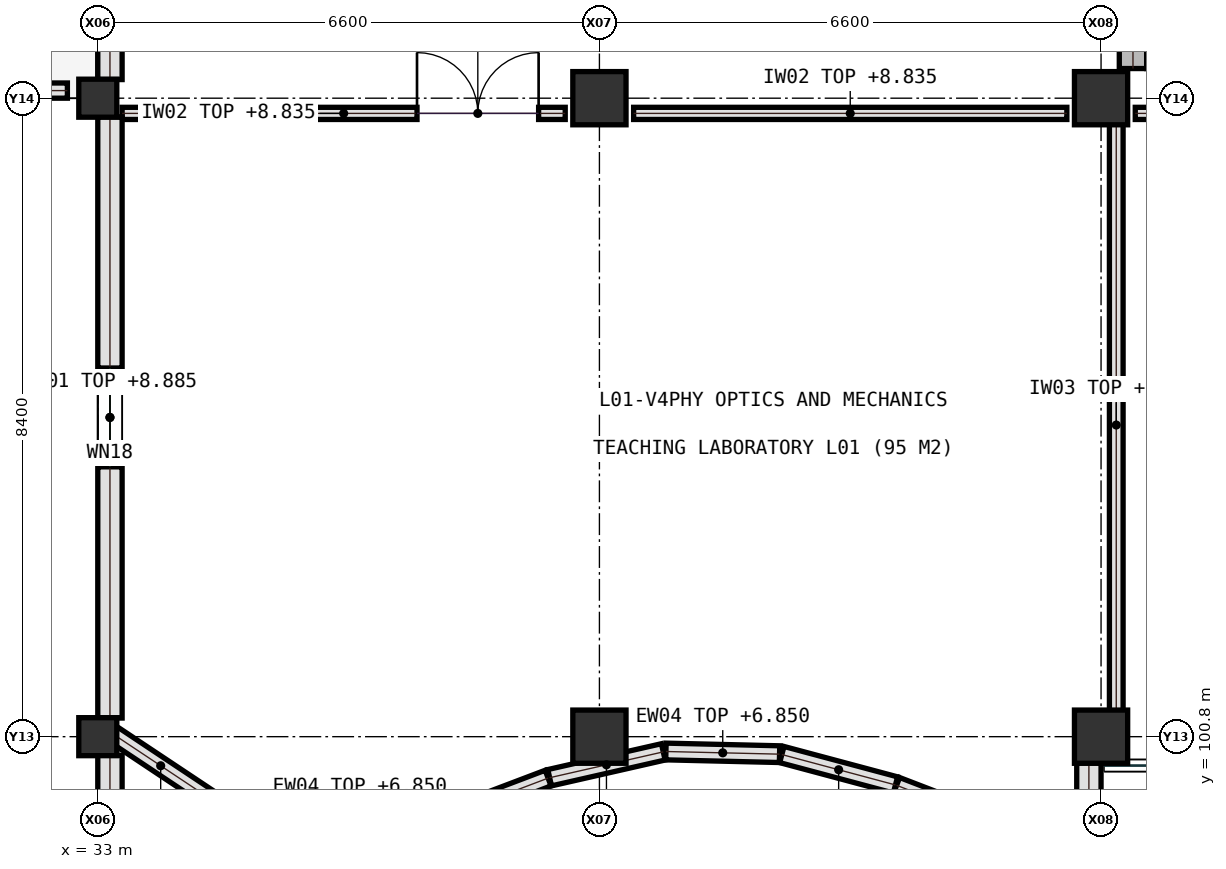
"""IFC4 building model, lengths in metres.
Left out: names, types, materials, properties, quantities, classifications, styles, units other than length and angle.
Written with IfcOpenShell. Run it as: python <this file> out.ifc"""

import sys

from ifc_helpers import new_model, si_unit, direction, frame, frame_2d, origin, origin_2d, place, context, subcontext, project, spatial, rectangle, extrude, element, fill, save


model = new_model("IFC4")
c1 = context("Model", 3, precision=1e-05, world=origin(), true_north=direction((0.0, 1.0)))
c2 = subcontext(c1, "Body", "Model", "MODEL_VIEW")
j1 = project(units=[si_unit("LENGTHUNIT", "METRE"), si_unit("PLANEANGLEUNIT", "RADIAN")], contexts=[c1])
p1 = place(None, origin())
s1 = spatial("IfcSite", under=j1, at=p1, CompositionType="ELEMENT")
p2 = place(p1, origin())
s2 = spatial("IfcBuilding", under=s1, at=p2, CompositionType="ELEMENT")
p3 = place(p2, frame((0.0, 0.0, 5.4)))
s3 = spatial("IfcBuildingStorey", under=s2, at=p3, CompositionType="ELEMENT", Elevation=5.4)
for number, where, z_axis, x_axis in (
    (1, (33.0, 100.8, 0.0), (0.0, 0.0, 1.0), (1.0, 0.0, 0.0)),
    (2, (33.0, 109.2, 0.0), (0.0, 0.0, 1.0), (1.0, 0.0, 0.0)),
):
    element("IfcColumn", number, at=place(p3, frame(where, z_axis=z_axis, x_axis=x_axis)), inside=s3, PredefinedType="COLUMN", context=c2, shape_type="SweptSolid", body=[
        extrude(rectangle(XDim=0.5, YDim=0.5, at=origin_2d()), origin(), (0.0, 0.0, 1.0), 4.5),
    ])
for number, where, z_axis, x_axis in (
    (3, (39.6, 100.8, 0.0), (0.0, 0.0, 1.0), (1.0, 0.0, 0.0)),
    (4, (39.6, 109.2, 0.0), (0.0, 0.0, 1.0), (1.0, 0.0, 0.0)),
    (5, (46.2, 100.8, 0.0), (0.0, 0.0, 1.0), (1.0, 0.0, 0.0)),
    (6, (46.2, 109.2, 0.0), (0.0, 0.0, 1.0), (1.0, 0.0, 0.0)),
):
    element("IfcColumn", number, at=place(p3, frame(where, z_axis=z_axis, x_axis=x_axis)), inside=s3, PredefinedType="COLUMN", context=c2, shape_type="SweptSolid", body=[
        extrude(rectangle(XDim=0.7, YDim=0.7, at=origin_2d()), origin(), (0.0, 0.0, 1.0), 4.5),
    ])
p4 = place(p3, frame((33.32, 109.0, 0.0), z_axis=(0.0, 0.0, 1.0), x_axis=(1.0, 0.0, 0.0)))
e7 = element("IfcWall", 7, at=p4, inside=s3, PredefinedType="PARTITIONING", context=c2, shape_type="SweptSolid", body=[
    extrude(rectangle(XDim=5.83, YDim=0.16, at=frame_2d((2.915, 0.0))), origin(), (0.0, 0.0, 1.0), 3.435),
])
p5 = place(p4, frame((3.88, 0.0, 0.0)))
e8 = element("IfcOpeningElement", 8, at=p5, cuts=e7, PredefinedType="OPENING", context=c2, shape_type="SweptSolid", body=[
    extrude(rectangle(XDim=1.6, YDim=2.2, at=frame_2d((0.8, 1.1))), frame((0.0, 0.09, 0.0), z_axis=(0.0, -1.0, 0.0), x_axis=(1.0, 0.0, 0.0)), (0.0, 0.0, 1.0), 0.18),
])
p6 = place(p3, frame((40.05, 109.0, 0.0), z_axis=(0.0, 0.0, 1.0), x_axis=(1.0, 0.0, 0.0)))
e9 = element("IfcWall", 9, at=p6, inside=s3, PredefinedType="PARTITIONING", context=c2, shape_type="SweptSolid", body=[
    extrude(rectangle(XDim=5.7, YDim=0.16, at=frame_2d((2.85, 0.0))), origin(), (0.0, 0.0, 1.0), 3.435),
])
p7 = place(p3, frame((46.65, 109.0, 0.0), z_axis=(0.0, 0.0, 1.0), x_axis=(1.0, 0.0, 0.0)))
e10 = element("IfcWall", 10, at=p7, inside=s3, PredefinedType="PARTITIONING", context=c2, shape_type="SweptSolid", body=[
    extrude(rectangle(XDim=5.7, YDim=0.16, at=frame_2d((2.85, 0.0))), origin(), (0.0, 0.0, 1.0), 3.435),
])
p8 = place(p3, frame((46.4, 100.8, 0.0), z_axis=(0.0, 0.0, 1.0), x_axis=(0.0, 1.0, 0.0)))
e11 = element("IfcWall", 11, at=p8, inside=s3, PredefinedType="SOLIDWALL", context=c2, shape_type="SweptSolid", body=[
    extrude(rectangle(XDim=8.2, YDim=0.18, at=frame_2d((4.1, 0.0))), origin(), (0.0, 0.0, 1.0), 3.45),
])
p9 = place(p3, frame((33.16, 100.555, 0.0), z_axis=(0.0, 0.0, 1.0), x_axis=(0.0, -1.0, 0.0)))
e12 = element("IfcWall", 12, at=p9, inside=s3, PredefinedType="SOLIDWALL", context=c2, shape_type="SweptSolid", body=[
    extrude(rectangle(XDim=7.91, YDim=0.32, at=frame_2d((3.955, 0.0))), origin(), (0.0, 0.0, 1.0), 3.635),
])
p10 = place(p9, frame((3.43, 0.0, 0.95)))
e13 = element("IfcOpeningElement", 13, at=p10, cuts=e12, PredefinedType="OPENING", context=c2, shape_type="SweptSolid", body=[
    extrude(rectangle(XDim=1.05, YDim=1.75, at=frame_2d((0.525, 0.875))), frame((0.0, 0.17, 0.0), z_axis=(0.0, -1.0, 0.0), x_axis=(1.0, 0.0, 0.0)), (0.0, 0.0, 1.0), 0.34),
])
p11 = place(p3, frame((33.16, 108.955, 0.0), z_axis=(0.0, 0.0, 1.0), x_axis=(0.0, -1.0, 0.0)))
e14 = element("IfcWall", 14, at=p11, inside=s3, PredefinedType="SOLIDWALL", context=c2, shape_type="SweptSolid", body=[
    extrude(rectangle(XDim=7.91, YDim=0.32, at=frame_2d((3.955, 0.0))), origin(), (0.0, 0.0, 1.0), 3.485),
])
p12 = place(p11, frame((3.305, 0.0, 0.95)))
e15 = element("IfcOpeningElement", 15, at=p12, cuts=e14, PredefinedType="OPENING", context=c2, shape_type="SweptSolid", body=[
    extrude(rectangle(XDim=1.3, YDim=1.75, at=frame_2d((0.65, 0.875))), frame((0.0, 0.17, 0.0), z_axis=(0.0, -1.0, 0.0), x_axis=(1.0, 0.0, 0.0)), (0.0, 0.0, 1.0), 0.34),
])
p13 = place(p3, frame((33.16, 117.355, 0.0), z_axis=(0.0, 0.0, 1.0), x_axis=(0.0, -1.0, 0.0)))
e16 = element("IfcWall", 16, at=p13, inside=s3, PredefinedType="SOLIDWALL", context=c2, shape_type="SweptSolid", body=[
    extrude(rectangle(XDim=7.91, YDim=0.32, at=frame_2d((3.955, 0.0))), origin(), (0.0, 0.0, 1.0), 3.635),
])
p14 = place(p13, frame((3.155, 0.0, 0.95)))
e17 = element("IfcOpeningElement", 17, at=p14, cuts=e16, PredefinedType="OPENING", context=c2, shape_type="SweptSolid", body=[
    extrude(rectangle(XDim=1.6, YDim=1.85, at=frame_2d((0.8, 0.925))), frame((0.0, 0.17, 0.0), z_axis=(0.0, -1.0, 0.0), x_axis=(1.0, 0.0, 0.0)), (0.0, 0.0, 1.0), 0.34),
])
p15 = place(p3, frame((46.04, 92.645, 0.0), z_axis=(0.0, 0.0, 1.0), x_axis=(0.0, 1.0, 0.0)))
e18 = element("IfcWall", 18, at=p15, inside=s3, PredefinedType="SOLIDWALL", context=c2, shape_type="SweptSolid", body=[
    extrude(rectangle(XDim=7.81, YDim=0.32, at=frame_2d((3.905, 0.0))), origin(), (0.0, 0.0, 1.0), 3.635),
])
p16 = place(p15, frame((3.38, 0.0, 0.95)))
e19 = element("IfcOpeningElement", 19, at=p16, cuts=e18, PredefinedType="OPENING", context=c2, shape_type="SweptSolid", body=[
    extrude(rectangle(XDim=1.05, YDim=1.75, at=frame_2d((0.525, 0.875))), frame((0.0, 0.17, 0.0), z_axis=(0.0, -1.0, 0.0), x_axis=(1.0, 0.0, 0.0)), (0.0, 0.0, 1.0), 0.34),
])
p17 = place(p3, frame((33.08, 100.915, 0.0), z_axis=(0.0, 0.0, 1.0), x_axis=(0.832426581762, -0.554135349871, 0.0)))
e20 = element("IfcWall", 20, at=p17, inside=s3, PredefinedType="SOLIDWALL", context=c2, shape_type="SweptSolid", body=[
    extrude(rectangle(XDim=1.796, YDim=0.22, at=frame_2d((0.898, 0.0))), origin(), (0.0, 0.0, 1.0), 1.45),
])
p18 = place(p3, frame((37.435, 99.69, 0.0), z_axis=(0.0, 0.0, 1.0), x_axis=(0.935044819014, 0.354529528297, 0.0)))
e21 = element("IfcWall", 21, at=p18, inside=s3, PredefinedType="SOLIDWALL", context=c2, shape_type="SweptSolid", body=[
    extrude(rectangle(XDim=1.594, YDim=0.22, at=frame_2d((0.797, 0.0))), origin(), (0.0, 0.0, 1.0), 1.45),
])
p19 = place(p3, frame((38.945, 100.26, 0.0), z_axis=(0.0, 0.0, 1.0), x_axis=(0.975084338019, 0.221834473765, 0.0)))
e22 = element("IfcWall", 22, at=p19, inside=s3, PredefinedType="SOLIDWALL", context=c2, shape_type="SweptSolid", body=[
    extrude(rectangle(XDim=1.533, YDim=0.22, at=frame_2d((0.767, 0.0))), origin(), (0.0, 0.0, 1.0), 1.45),
])
p20 = place(p3, frame((40.475, 100.605, 0.0), z_axis=(0.0, 0.0, 1.0), x_axis=(0.999727393664, -0.023348198154, 0.0)))
e23 = element("IfcWall", 23, at=p20, inside=s3, PredefinedType="SOLIDWALL", context=c2, shape_type="SweptSolid", body=[
    extrude(rectangle(XDim=1.495, YDim=0.22, at=frame_2d((0.748, 0.0))), origin(), (0.0, 0.0, 1.0), 1.45),
])
p21 = place(p3, frame((42.0, 100.565, 0.0), z_axis=(0.0, 0.0, 1.0), x_axis=(0.966040919429, -0.258389129005, 0.0)))
e24 = element("IfcWall", 24, at=p21, inside=s3, PredefinedType="SOLIDWALL", context=c2, shape_type="SweptSolid", body=[
    extrude(rectangle(XDim=1.548, YDim=0.22, at=frame_2d((0.774, 0.0))), origin(), (0.0, 0.0, 1.0), 1.45),
])
p22 = place(p3, frame((43.51, 100.16, 0.0), z_axis=(0.0, 0.0, 1.0), x_axis=(0.933345606203, -0.358979079309, 0.0)))
e25 = element("IfcWall", 25, at=p22, inside=s3, PredefinedType="SOLIDWALL", context=c2, shape_type="SweptSolid", body=[
    extrude(rectangle(XDim=1.602, YDim=0.22, at=frame_2d((0.801, 0.0))), origin(), (0.0, 0.0, 1.0), 1.45),
])
p23 = place(p3, frame((6.8, 109.3, 0.0), z_axis=(0.0, 0.0, 1.0), x_axis=(1.0, 0.0, 0.0)))
e26 = element("IfcWall", 26, at=p23, inside=s3, PredefinedType="PARAPET", context=c2, shape_type="SweptSolid", body=[
    extrude(rectangle(XDim=25.8, YDim=0.2, at=frame_2d((12.9, 0.0))), origin(), (0.0, 0.0, 1.0), 1.1),
])
p24 = place(p3, frame((46.62, 109.59, 0.0), z_axis=(0.0, 0.0, 1.0), x_axis=(0.0, 1.0, 0.0)))
e27 = element("IfcWall", 27, at=p24, inside=s3, PredefinedType="SHEAR", context=c2, shape_type="SweptSolid", body=[
    extrude(rectangle(XDim=7.84, YDim=0.36, at=frame_2d((3.92, 0.0))), origin(), (0.0, 0.0, 1.0), 4.2),
])
p25 = place(p5, origin())
e28 = element("IfcDoor", 28, at=p25, inside=s3, OperationType="DOUBLE_DOOR_SINGLE_SWING", PredefinedType="DOOR", context=c2, shape_type="SweptSolid", body=[
    extrude(rectangle(XDim=1.6, YDim=2.2, at=frame_2d((0.8, 1.1))), frame((0.0, 0.025, 0.0), z_axis=(0.0, -1.0, 0.0), x_axis=(1.0, 0.0, 0.0)), (0.0, 0.0, 1.0), 0.05),
])
fill(e8, e28)
p26 = place(p12, origin())
e29 = element("IfcWindow", 29, at=p26, inside=s3, PartitioningType="SINGLE_PANEL", PredefinedType="WINDOW", context=c2, shape_type="SweptSolid", body=[
    extrude(rectangle(XDim=1.3, YDim=1.75, at=frame_2d((0.65, 0.875))), frame((0.0, 0.03, 0.0), z_axis=(0.0, -1.0, 0.0), x_axis=(1.0, 0.0, 0.0)), (0.0, 0.0, 1.0), 0.06),
])
fill(e15, e29)
save(model, sys.argv[1])
